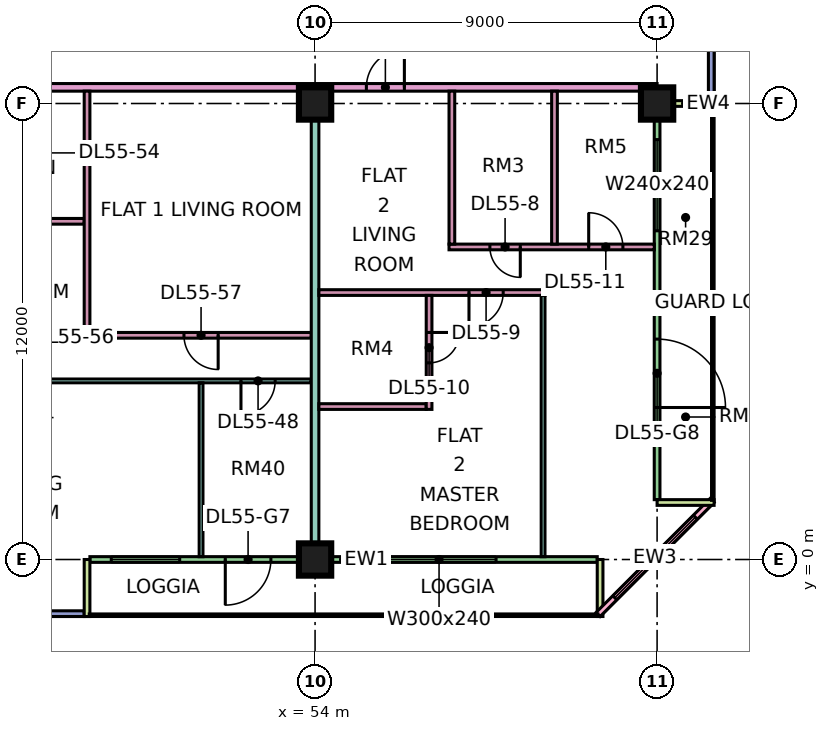
"""IFC4 building model, lengths in metres.
Left out: names, types, materials, properties, quantities, classifications, styles, units other than length and angle.
Written with IfcOpenShell. Run it as: python <this file> out.ifc"""

import sys

from ifc_helpers import new_model, si_unit, direction, frame, frame_2d, origin, origin_2d, place, context, subcontext, project, spatial, rectangle, extrude, element, fill, save


model = new_model("IFC4")
c1 = context("Model", 3, precision=1e-05, world=origin(), true_north=direction((0.0, 1.0)))
c2 = subcontext(c1, "Body", "Model", "MODEL_VIEW")
j1 = project(units=[si_unit("LENGTHUNIT", "METRE"), si_unit("PLANEANGLEUNIT", "RADIAN")], contexts=[c1])
p1 = place(None, origin())
s1 = spatial("IfcSite", under=j1, at=p1, CompositionType="ELEMENT")
p2 = place(p1, origin())
s2 = spatial("IfcBuilding", under=s1, at=p2, CompositionType="ELEMENT")
p3 = place(p2, frame((0.0, 0.0, 234.15)))
s3 = spatial("IfcBuildingStorey", under=s2, at=p3, CompositionType="ELEMENT", Elevation=234.15)
for number, where, z_axis, x_axis in (
    (1, (54.0, 0.0, 0.0), (0.0, 0.0, 1.0), (1.0, 0.0, 0.0)),
    (2, (54.0, 12.0, 0.0), (0.0, 0.0, 1.0), (1.0, 0.0, 0.0)),
    (3, (63.0, 12.0, 0.0), (0.0, 0.0, 1.0), (1.0, 0.0, 0.0)),
):
    element("IfcColumn", number, at=place(p3, frame(where, z_axis=z_axis, x_axis=x_axis)), inside=s3, PredefinedType="COLUMN", context=c2, shape_type="SweptSolid", body=[
        extrude(rectangle(XDim=0.85, YDim=0.85, at=origin_2d()), origin(), (0.0, 0.0, 1.0), 3.75),
    ])
p4 = place(p3, frame((36.075, -1.425, 0.0), z_axis=(0.0, 0.0, 1.0), x_axis=(1.0, 0.0, 0.0)))
e4 = element("IfcWall", 4, at=p4, inside=s3, PredefinedType="SOLIDWALL", context=c2, shape_type="SweptSolid", body=[
    extrude(rectangle(XDim=11.85, YDim=0.15, at=frame_2d((5.925, 0.0))), origin(), (0.0, 0.0, 1.0), 3.35),
])
p5 = place(p4, frame((0.562, 0.0, 0.45)))
e5 = element("IfcOpeningElement", 5, at=p5, cuts=e4, PredefinedType="OPENING", context=c2, shape_type="SweptSolid", body=[
    extrude(rectangle(XDim=1.8, YDim=2.4, at=frame_2d((0.9, 1.2))), frame((0.0, 0.085, 0.0), z_axis=(0.0, -1.0, 0.0), x_axis=(1.0, 0.0, 0.0)), (0.0, 0.0, 1.0), 0.17),
])
p6 = place(p4, frame((3.525, 0.0, 0.45)))
e6 = element("IfcOpeningElement", 6, at=p6, cuts=e4, PredefinedType="OPENING", context=c2, shape_type="SweptSolid", body=[
    extrude(rectangle(XDim=1.8, YDim=2.4, at=frame_2d((0.9, 1.2))), frame((0.0, 0.085, 0.0), z_axis=(0.0, -1.0, 0.0), x_axis=(1.0, 0.0, 0.0)), (0.0, 0.0, 1.0), 0.17),
])
p7 = place(p4, frame((7.387, 0.0, 0.45)))
e7 = element("IfcOpeningElement", 7, at=p7, cuts=e4, PredefinedType="OPENING", context=c2, shape_type="SweptSolid", body=[
    extrude(rectangle(XDim=3.0, YDim=2.4, at=frame_2d((1.5, 1.2))), frame((0.0, 0.085, 0.0), z_axis=(0.0, -1.0, 0.0), x_axis=(1.0, 0.0, 0.0)), (0.0, 0.0, 1.0), 0.17),
])
p8 = place(p3, frame((48.075, 0.0, 0.0), z_axis=(0.0, 0.0, 1.0), x_axis=(1.0, 0.0, 0.0)))
e8 = element("IfcWall", 8, at=p8, inside=s3, PredefinedType="SOLIDWALL", context=c2, shape_type="SweptSolid", body=[
    extrude(rectangle(XDim=13.35, YDim=0.15, at=frame_2d((6.675, 0.0))), origin(), (0.0, 0.0, 1.0), 3.35),
])
p9 = place(p8, frame((0.562, 0.0, 0.45)))
e9 = element("IfcOpeningElement", 9, at=p9, cuts=e8, PredefinedType="OPENING", context=c2, shape_type="SweptSolid", body=[
    extrude(rectangle(XDim=1.8, YDim=2.4, at=frame_2d((0.9, 1.2))), frame((0.0, 0.085, 0.0), z_axis=(0.0, -1.0, 0.0), x_axis=(1.0, 0.0, 0.0)), (0.0, 0.0, 1.0), 0.17),
])
p10 = place(p8, frame((3.562, 0.0, 0.0)))
e10 = element("IfcOpeningElement", 10, at=p10, cuts=e8, PredefinedType="OPENING", context=c2, shape_type="SweptSolid", body=[
    extrude(rectangle(XDim=1.2, YDim=2.4, at=frame_2d((0.6, 1.2))), frame((0.0, 0.085, 0.0), z_axis=(0.0, -1.0, 0.0), x_axis=(1.0, 0.0, 0.0)), (0.0, 0.0, 1.0), 0.17),
])
p11 = place(p8, frame((7.688, 0.0, 0.45)))
e11 = element("IfcOpeningElement", 11, at=p11, cuts=e8, PredefinedType="OPENING", context=c2, shape_type="SweptSolid", body=[
    extrude(rectangle(XDim=3.0, YDim=2.4, at=frame_2d((1.5, 1.2))), frame((0.0, 0.085, 0.0), z_axis=(0.0, -1.0, 0.0), x_axis=(1.0, 0.0, 0.0)), (0.0, 0.0, 1.0), 0.17),
])
for number, where, z_axis, x_axis in (
    (12, (48.0, -1.5, 0.0), (0.0, 0.0, 1.0), (0.0, 1.0, 0.0)),
    (13, (61.5, -1.5, 0.0), (0.0, 0.0, 1.0), (0.0, 1.0, 0.0)),
):
    element("IfcWall", number, at=place(p3, frame(where, z_axis=z_axis, x_axis=x_axis)), inside=s3, PredefinedType="SOLIDWALL", context=c2, shape_type="SweptSolid", body=[
        extrude(rectangle(XDim=1.5, YDim=0.15, at=frame_2d((0.75, 0.0))), origin(), (0.0, 0.0, 1.0), 3.35),
    ])
p12 = place(p3, frame((61.447, -1.447, 0.0), z_axis=(0.0, 0.0, 1.0), x_axis=(0.707106781187, 0.707106781187, 0.0)))
e14 = element("IfcWall", 14, at=p12, inside=s3, PredefinedType="SOLIDWALL", context=c2, shape_type="SweptSolid", body=[
    extrude(rectangle(XDim=4.243, YDim=0.15, at=frame_2d((2.121, 0.0))), origin(), (0.0, 0.0, 1.0), 3.35),
])
p13 = place(p12, frame((0.621, 0.0, 0.45)))
e15 = element("IfcOpeningElement", 15, at=p13, cuts=e14, PredefinedType="OPENING", context=c2, shape_type="SweptSolid", body=[
    extrude(rectangle(XDim=3.0, YDim=2.4, at=frame_2d((1.5, 1.2))), frame((0.0, 0.085, 0.0), z_axis=(0.0, -1.0, 0.0), x_axis=(1.0, 0.0, 0.0)), (0.0, 0.0, 1.0), 0.17),
])
p14 = place(p3, frame((63.0, 1.575, 0.0), z_axis=(0.0, 0.0, 1.0), x_axis=(0.0, 1.0, 0.0)))
e16 = element("IfcWall", 16, at=p14, inside=s3, PredefinedType="SOLIDWALL", context=c2, shape_type="SweptSolid", body=[
    extrude(rectangle(XDim=10.35, YDim=0.15, at=frame_2d((5.175, 0.0))), origin(), (0.0, 0.0, 1.0), 3.35),
])
p15 = place(p14, frame((2.425, 0.0, 0.0)))
e17 = element("IfcOpeningElement", 17, at=p15, cuts=e16, PredefinedType="OPENING", context=c2, shape_type="SweptSolid", body=[
    extrude(rectangle(XDim=1.8, YDim=2.4, at=frame_2d((0.9, 1.2))), frame((0.0, 0.085, 0.0), z_axis=(0.0, -1.0, 0.0), x_axis=(1.0, 0.0, 0.0)), (0.0, 0.0, 1.0), 0.17),
])
p16 = place(p14, frame((7.075, 0.0, 0.45)))
e18 = element("IfcOpeningElement", 18, at=p16, cuts=e16, PredefinedType="OPENING", context=c2, shape_type="SweptSolid", body=[
    extrude(rectangle(XDim=2.4, YDim=2.4, at=frame_2d((1.2, 1.2))), frame((0.0, 0.085, 0.0), z_axis=(0.0, -1.0, 0.0), x_axis=(1.0, 0.0, 0.0)), (0.0, 0.0, 1.0), 0.17),
])
for number, where, z_axis, x_axis in (
    (19, (64.5, 1.5, 0.0), (0.0, 0.0, 1.0), (-1.0, 0.0, 0.0)),
    (20, (64.5, 12.0, 0.0), (0.0, 0.0, 1.0), (-1.0, 0.0, 0.0)),
):
    element("IfcWall", number, at=place(p3, frame(where, z_axis=z_axis, x_axis=x_axis)), inside=s3, PredefinedType="SOLIDWALL", context=c2, shape_type="SweptSolid", body=[
        extrude(rectangle(XDim=1.5, YDim=0.15, at=frame_2d((0.75, 0.0))), origin(), (0.0, 0.0, 1.0), 3.35),
    ])
p17 = place(p3, frame((64.425, 12.075, 0.0), z_axis=(0.0, 0.0, 1.0), x_axis=(0.0, 1.0, 0.0)))
e21 = element("IfcWall", 21, at=p17, inside=s3, PredefinedType="SOLIDWALL", context=c2, shape_type="SweptSolid", body=[
    extrude(rectangle(XDim=10.425, YDim=0.15, at=frame_2d((5.212, 0.0))), origin(), (0.0, 0.0, 1.0), 3.35),
])
p18 = place(p17, frame((5.475, 0.0, 0.45)))
e22 = element("IfcOpeningElement", 22, at=p18, cuts=e21, PredefinedType="OPENING", context=c2, shape_type="SweptSolid", body=[
    extrude(rectangle(XDim=3.0, YDim=2.4, at=frame_2d((1.5, 1.2))), frame((0.0, 0.085, 0.0), z_axis=(0.0, -1.0, 0.0), x_axis=(1.0, 0.0, 0.0)), (0.0, 0.0, 1.0), 0.17),
])
p19 = place(p3, frame((33.05, 4.7, 0.0), z_axis=(0.0, 0.0, 1.0), x_axis=(1.0, 0.0, 0.0)))
e23 = element("IfcWall", 23, at=p19, inside=s3, PredefinedType="PARTITIONING", context=c2, shape_type="SweptSolid", body=[
    extrude(rectangle(XDim=20.85, YDim=0.1, at=frame_2d((10.425, 0.0))), origin(), (0.0, 0.0, 1.0), 3.35),
])
p20 = place(p19, frame((1.0, 0.0, 0.0)))
e24 = element("IfcOpeningElement", 24, at=p20, cuts=e23, PredefinedType="OPENING", context=c2, shape_type="SweptSolid", body=[
    extrude(rectangle(XDim=0.9, YDim=2.1, at=frame_2d((0.45, 1.05))), frame((0.0, 0.06, 0.0), z_axis=(0.0, -1.0, 0.0), x_axis=(1.0, 0.0, 0.0)), (0.0, 0.0, 1.0), 0.12),
])
p21 = place(p19, frame((4.0, 0.0, 0.0)))
e25 = element("IfcOpeningElement", 25, at=p21, cuts=e23, PredefinedType="OPENING", context=c2, shape_type="SweptSolid", body=[
    extrude(rectangle(XDim=0.9, YDim=2.1, at=frame_2d((0.45, 1.05))), frame((0.0, 0.06, 0.0), z_axis=(0.0, -1.0, 0.0), x_axis=(1.0, 0.0, 0.0)), (0.0, 0.0, 1.0), 0.12),
])
p22 = place(p19, frame((7.0, 0.0, 0.0)))
e26 = element("IfcOpeningElement", 26, at=p22, cuts=e23, PredefinedType="OPENING", context=c2, shape_type="SweptSolid", body=[
    extrude(rectangle(XDim=0.9, YDim=2.1, at=frame_2d((0.45, 1.05))), frame((0.0, 0.06, 0.0), z_axis=(0.0, -1.0, 0.0), x_axis=(1.0, 0.0, 0.0)), (0.0, 0.0, 1.0), 0.12),
])
p23 = place(p19, frame((19.0, 0.0, 0.0)))
e27 = element("IfcOpeningElement", 27, at=p23, cuts=e23, PredefinedType="OPENING", context=c2, shape_type="SweptSolid", body=[
    extrude(rectangle(XDim=0.9, YDim=2.1, at=frame_2d((0.45, 1.05))), frame((0.0, 0.06, 0.0), z_axis=(0.0, -1.0, 0.0), x_axis=(1.0, 0.0, 0.0)), (0.0, 0.0, 1.0), 0.12),
])
p24 = place(p19, frame((13.0, 0.0, 0.0)))
e28 = element("IfcOpeningElement", 28, at=p24, cuts=e23, PredefinedType="OPENING", context=c2, shape_type="SweptSolid", body=[
    extrude(rectangle(XDim=0.9, YDim=2.1, at=frame_2d((0.45, 1.05))), frame((0.0, 0.06, 0.0), z_axis=(0.0, -1.0, 0.0), x_axis=(1.0, 0.0, 0.0)), (0.0, 0.0, 1.0), 0.12),
])
p25 = place(p3, frame((40.65, 12.425, 0.0), z_axis=(0.0, 0.0, 1.0), x_axis=(1.0, 0.0, 0.0)))
e29 = element("IfcWall", 29, at=p25, inside=s3, PredefinedType="PARTITIONING", context=c2, shape_type="SweptSolid", body=[
    extrude(rectangle(XDim=22.35, YDim=0.2, at=frame_2d((11.175, 0.0))), origin(), (0.0, 0.0, 1.0), 3.35),
])
p26 = place(p25, frame((14.7, 0.0, 0.0)))
e30 = element("IfcOpeningElement", 30, at=p26, cuts=e29, PredefinedType="OPENING", context=c2, shape_type="SweptSolid", body=[
    extrude(rectangle(XDim=1.0, YDim=2.1, at=frame_2d((0.5, 1.05))), frame((0.0, 0.11, 0.0), z_axis=(0.0, -1.0, 0.0), x_axis=(1.0, 0.0, 0.0)), (0.0, 0.0, 1.0), 0.22),
])
p27 = place(p25, frame((1.05, 0.0, 0.0)))
e31 = element("IfcOpeningElement", 31, at=p27, cuts=e29, PredefinedType="OPENING", context=c2, shape_type="SweptSolid", body=[
    extrude(rectangle(XDim=1.0, YDim=2.1, at=frame_2d((0.5, 1.05))), frame((0.0, 0.11, 0.0), z_axis=(0.0, -1.0, 0.0), x_axis=(1.0, 0.0, 0.0)), (0.0, 0.0, 1.0), 0.22),
])
p28 = place(p3, frame((43.575, 5.9, 0.0), z_axis=(0.0, 0.0, 1.0), x_axis=(1.0, 0.0, 0.0)))
e32 = element("IfcWall", 32, at=p28, inside=s3, PredefinedType="PARTITIONING", context=c2, shape_type="SweptSolid", body=[
    extrude(rectangle(XDim=10.325, YDim=0.15, at=frame_2d((5.163, 0.0))), origin(), (0.0, 0.0, 1.0), 3.35),
])
p29 = place(p28, frame((1.825, 0.0, 0.0)))
e33 = element("IfcOpeningElement", 33, at=p29, cuts=e32, PredefinedType="OPENING", context=c2, shape_type="SweptSolid", body=[
    extrude(rectangle(XDim=0.8, YDim=2.1, at=frame_2d((0.4, 1.05))), frame((0.0, 0.085, 0.0), z_axis=(0.0, -1.0, 0.0), x_axis=(1.0, 0.0, 0.0)), (0.0, 0.0, 1.0), 0.17),
])
p30 = place(p28, frame((6.975, 0.0, 0.0)))
e34 = element("IfcOpeningElement", 34, at=p30, cuts=e32, PredefinedType="OPENING", context=c2, shape_type="SweptSolid", body=[
    extrude(rectangle(XDim=0.9, YDim=2.1, at=frame_2d((0.45, 1.05))), frame((0.0, 0.085, 0.0), z_axis=(0.0, -1.0, 0.0), x_axis=(1.0, 0.0, 0.0)), (0.0, 0.0, 1.0), 0.17),
])
p31 = place(p3, frame((43.725, 8.9, 0.0), z_axis=(0.0, 0.0, 1.0), x_axis=(1.0, 0.0, 0.0)))
e35 = element("IfcWall", 35, at=p31, inside=s3, PredefinedType="PARTITIONING", context=c2, shape_type="SweptSolid", body=[
    extrude(rectangle(XDim=4.2, YDim=0.15, at=frame_2d((2.1, 0.0))), origin(), (0.0, 0.0, 1.0), 3.35),
])
p32 = place(p3, frame((48.0, 5.975, 0.0), z_axis=(0.0, 0.0, 1.0), x_axis=(0.0, 1.0, 0.0)))
e36 = element("IfcWall", 36, at=p32, inside=s3, PredefinedType="PARTITIONING", context=c2, shape_type="SweptSolid", body=[
    extrude(rectangle(XDim=6.35, YDim=0.15, at=frame_2d((3.175, 0.0))), origin(), (0.0, 0.0, 1.0), 3.35),
])
p33 = place(p3, frame((51.0, 0.074, 0.0), z_axis=(0.0, 0.0, 1.0), x_axis=(0.0, 1.0, 0.0)))
e37 = element("IfcWall", 37, at=p33, inside=s3, PredefinedType="PARTITIONING", context=c2, shape_type="SweptSolid", body=[
    extrude(rectangle(XDim=4.576, YDim=0.1, at=frame_2d((2.288, 0.0))), origin(), (0.0, 0.0, 1.0), 3.35),
])
p34 = place(p3, frame((54.0, 0.074, 0.0), z_axis=(0.0, 0.0, 1.0), x_axis=(0.0, 1.0, 0.0)))
e38 = element("IfcWall", 38, at=p34, inside=s3, PredefinedType="PARTITIONING", context=c2, shape_type="SweptSolid", body=[
    extrude(rectangle(XDim=12.251, YDim=0.2, at=frame_2d((6.125, 0.0))), origin(), (0.0, 0.0, 1.0), 3.35),
])
p35 = place(p3, frame((54.1, 4.025, 0.0), z_axis=(0.0, 0.0, 1.0), x_axis=(1.0, 0.0, 0.0)))
e39 = element("IfcWall", 39, at=p35, inside=s3, PredefinedType="PARTITIONING", context=c2, shape_type="SweptSolid", body=[
    extrude(rectangle(XDim=2.825, YDim=0.15, at=frame_2d((1.413, 0.0))), origin(), (0.0, 0.0, 1.0), 3.35),
])
p36 = place(p3, frame((54.1, 7.025, 0.0), z_axis=(0.0, 0.0, 1.0), x_axis=(1.0, 0.0, 0.0)))
e40 = element("IfcWall", 40, at=p36, inside=s3, PredefinedType="PARTITIONING", context=c2, shape_type="SweptSolid", body=[
    extrude(rectangle(XDim=5.95, YDim=0.15, at=frame_2d((2.975, 0.0))), origin(), (0.0, 0.0, 1.0), 3.35),
])
p37 = place(p36, frame((3.95, 0.0, 0.0)))
e41 = element("IfcOpeningElement", 41, at=p37, cuts=e40, PredefinedType="OPENING", context=c2, shape_type="SweptSolid", body=[
    extrude(rectangle(XDim=0.9, YDim=2.1, at=frame_2d((0.45, 1.05))), frame((0.0, 0.085, 0.0), z_axis=(0.0, -1.0, 0.0), x_axis=(1.0, 0.0, 0.0)), (0.0, 0.0, 1.0), 0.17),
])
p38 = place(p3, frame((57.0, 3.95, 0.0), z_axis=(0.0, 0.0, 1.0), x_axis=(0.0, 1.0, 0.0)))
e42 = element("IfcWall", 42, at=p38, inside=s3, PredefinedType="PARTITIONING", context=c2, shape_type="SweptSolid", body=[
    extrude(rectangle(XDim=3.0, YDim=0.15, at=frame_2d((1.5, 0.0))), origin(), (0.0, 0.0, 1.0), 3.35),
])
p39 = place(p38, frame((1.225, 0.0, 0.0)))
e43 = element("IfcOpeningElement", 43, at=p39, cuts=e42, PredefinedType="OPENING", context=c2, shape_type="SweptSolid", body=[
    extrude(rectangle(XDim=0.8, YDim=2.1, at=frame_2d((0.4, 1.05))), frame((0.0, 0.085, 0.0), z_axis=(0.0, -1.0, 0.0), x_axis=(1.0, 0.0, 0.0)), (0.0, 0.0, 1.0), 0.17),
])
p40 = place(p3, frame((57.525, 8.225, 0.0), z_axis=(0.0, 0.0, 1.0), x_axis=(1.0, 0.0, 0.0)))
e44 = element("IfcWall", 44, at=p40, inside=s3, PredefinedType="PARTITIONING", context=c2, shape_type="SweptSolid", body=[
    extrude(rectangle(XDim=5.401, YDim=0.15, at=frame_2d((2.701, 0.0))), origin(), (0.0, 0.0, 1.0), 3.35),
])
p41 = place(p40, frame((1.075, 0.0, 0.0)))
e45 = element("IfcOpeningElement", 45, at=p41, cuts=e44, PredefinedType="OPENING", context=c2, shape_type="SweptSolid", body=[
    extrude(rectangle(XDim=0.8, YDim=2.1, at=frame_2d((0.4, 1.05))), frame((0.0, 0.085, 0.0), z_axis=(0.0, -1.0, 0.0), x_axis=(1.0, 0.0, 0.0)), (0.0, 0.0, 1.0), 0.17),
])
p42 = place(p40, frame((3.675, 0.0, 0.0)))
e46 = element("IfcOpeningElement", 46, at=p42, cuts=e44, PredefinedType="OPENING", context=c2, shape_type="SweptSolid", body=[
    extrude(rectangle(XDim=0.9, YDim=2.1, at=frame_2d((0.45, 1.05))), frame((0.0, 0.085, 0.0), z_axis=(0.0, -1.0, 0.0), x_axis=(1.0, 0.0, 0.0)), (0.0, 0.0, 1.0), 0.17),
])
p43 = place(p3, frame((57.6, 8.3, 0.0), z_axis=(0.0, 0.0, 1.0), x_axis=(0.0, 1.0, 0.0)))
e47 = element("IfcWall", 47, at=p43, inside=s3, PredefinedType="PARTITIONING", context=c2, shape_type="SweptSolid", body=[
    extrude(rectangle(XDim=4.025, YDim=0.15, at=frame_2d((2.012, 0.0))), origin(), (0.0, 0.0, 1.0), 3.35),
])
p44 = place(p3, frame((60.0, 0.074, 0.0), z_axis=(0.0, 0.0, 1.0), x_axis=(0.0, 1.0, 0.0)))
e48 = element("IfcWall", 48, at=p44, inside=s3, PredefinedType="PARTITIONING", context=c2, shape_type="SweptSolid", body=[
    extrude(rectangle(XDim=6.876, YDim=0.1, at=frame_2d((3.438, 0.0))), origin(), (0.0, 0.0, 1.0), 3.35),
])
p45 = place(p3, frame((60.3, 8.3, 0.0), z_axis=(0.0, 0.0, 1.0), x_axis=(0.0, 1.0, 0.0)))
e49 = element("IfcWall", 49, at=p45, inside=s3, PredefinedType="PARTITIONING", context=c2, shape_type="SweptSolid", body=[
    extrude(rectangle(XDim=4.025, YDim=0.15, at=frame_2d((2.012, 0.0))), origin(), (0.0, 0.0, 1.0), 3.35),
])
p46 = place(p9, origin())
e50 = element("IfcWindow", 50, at=p46, inside=s3, PartitioningType="SINGLE_PANEL", PredefinedType="WINDOW", context=c2, shape_type="SweptSolid", body=[
    extrude(rectangle(XDim=1.8, YDim=2.4, at=frame_2d((0.9, 1.2))), frame((0.0, 0.03, 0.0), z_axis=(0.0, -1.0, 0.0), x_axis=(1.0, 0.0, 0.0)), (0.0, 0.0, 1.0), 0.06),
])
fill(e9, e50)
p47 = place(p10, frame((1.2, 0.0, 0.0), z_axis=(0.0, 0.0, 1.0), x_axis=(-1.0, 0.0, 0.0)))
e51 = element("IfcDoor", 51, at=p47, inside=s3, OperationType="DOUBLE_DOOR_SINGLE_SWING", PredefinedType="DOOR", context=c2, shape_type="SweptSolid", body=[
    extrude(rectangle(XDim=1.2, YDim=2.4, at=frame_2d((0.6, 1.2))), frame((0.0, 0.025, 0.0), z_axis=(0.0, -1.0, 0.0), x_axis=(1.0, 0.0, 0.0)), (0.0, 0.0, 1.0), 0.05),
])
fill(e10, e51)
p48 = place(p11, origin())
e52 = element("IfcWindow", 52, at=p48, inside=s3, PartitioningType="SINGLE_PANEL", PredefinedType="WINDOW", context=c2, shape_type="SweptSolid", body=[
    extrude(rectangle(XDim=3.0, YDim=2.4, at=frame_2d((1.5, 1.2))), frame((0.0, 0.03, 0.0), z_axis=(0.0, -1.0, 0.0), x_axis=(1.0, 0.0, 0.0)), (0.0, 0.0, 1.0), 0.06),
])
fill(e11, e52)
p49 = place(p13, origin())
e53 = element("IfcWindow", 53, at=p49, inside=s3, PartitioningType="SINGLE_PANEL", PredefinedType="WINDOW", context=c2, shape_type="SweptSolid", body=[
    extrude(rectangle(XDim=3.0, YDim=2.4, at=frame_2d((1.5, 1.2))), frame((0.0, 0.03, 0.0), z_axis=(0.0, -1.0, 0.0), x_axis=(1.0, 0.0, 0.0)), (0.0, 0.0, 1.0), 0.06),
])
fill(e15, e53)
p50 = place(p15, frame((1.8, 0.0, 0.0), z_axis=(0.0, 0.0, 1.0), x_axis=(-1.0, 0.0, 0.0)))
e54 = element("IfcDoor", 54, at=p50, inside=s3, OperationType="DOUBLE_DOOR_SINGLE_SWING", PredefinedType="DOOR", context=c2, shape_type="SweptSolid", body=[
    extrude(rectangle(XDim=1.8, YDim=2.4, at=frame_2d((0.9, 1.2))), frame((0.0, 0.025, 0.0), z_axis=(0.0, -1.0, 0.0), x_axis=(1.0, 0.0, 0.0)), (0.0, 0.0, 1.0), 0.05),
])
fill(e17, e54)
p51 = place(p16, origin())
e55 = element("IfcWindow", 55, at=p51, inside=s3, PartitioningType="SINGLE_PANEL", PredefinedType="WINDOW", context=c2, shape_type="SweptSolid", body=[
    extrude(rectangle(XDim=2.4, YDim=2.4, at=frame_2d((1.2, 1.2))), frame((0.0, 0.03, 0.0), z_axis=(0.0, -1.0, 0.0), x_axis=(1.0, 0.0, 0.0)), (0.0, 0.0, 1.0), 0.06),
])
fill(e18, e55)
p52 = place(p41, origin())
e56 = element("IfcDoor", 56, at=p52, inside=s3, OperationType="SINGLE_SWING_RIGHT", PredefinedType="DOOR", context=c2, shape_type="SweptSolid", body=[
    extrude(rectangle(XDim=0.8, YDim=2.1, at=frame_2d((0.4, 1.05))), frame((0.0, 0.025, 0.0), z_axis=(0.0, -1.0, 0.0), x_axis=(1.0, 0.0, 0.0)), (0.0, 0.0, 1.0), 0.05),
])
fill(e45, e56)
p53 = place(p37, frame((0.9, 0.0, 0.0), z_axis=(0.0, 0.0, 1.0), x_axis=(-1.0, 0.0, 0.0)))
e57 = element("IfcDoor", 57, at=p53, inside=s3, OperationType="SINGLE_SWING_LEFT", PredefinedType="DOOR", context=c2, shape_type="SweptSolid", body=[
    extrude(rectangle(XDim=0.9, YDim=2.1, at=frame_2d((0.45, 1.05))), frame((0.0, 0.025, 0.0), z_axis=(0.0, -1.0, 0.0), x_axis=(1.0, 0.0, 0.0)), (0.0, 0.0, 1.0), 0.05),
])
fill(e41, e57)
p54 = place(p39, origin())
e58 = element("IfcDoor", 58, at=p54, inside=s3, OperationType="SINGLE_SWING_RIGHT", PredefinedType="DOOR", context=c2, shape_type="SweptSolid", body=[
    extrude(rectangle(XDim=0.8, YDim=2.1, at=frame_2d((0.4, 1.05))), frame((0.0, 0.025, 0.0), z_axis=(0.0, -1.0, 0.0), x_axis=(1.0, 0.0, 0.0)), (0.0, 0.0, 1.0), 0.05),
])
fill(e43, e58)
p55 = place(p42, origin())
e59 = element("IfcDoor", 59, at=p55, inside=s3, OperationType="SINGLE_SWING_LEFT", PredefinedType="DOOR", context=c2, shape_type="SweptSolid", body=[
    extrude(rectangle(XDim=0.9, YDim=2.1, at=frame_2d((0.45, 1.05))), frame((0.0, 0.025, 0.0), z_axis=(0.0, -1.0, 0.0), x_axis=(1.0, 0.0, 0.0)), (0.0, 0.0, 1.0), 0.05),
])
fill(e46, e59)
p56 = place(p26, frame((1.0, 0.0, 0.0), z_axis=(0.0, 0.0, 1.0), x_axis=(-1.0, 0.0, 0.0)))
e60 = element("IfcDoor", 60, at=p56, inside=s3, OperationType="SINGLE_SWING_RIGHT", PredefinedType="DOOR", context=c2, shape_type="SweptSolid", body=[
    extrude(rectangle(XDim=1.0, YDim=2.1, at=frame_2d((0.5, 1.05))), frame((0.0, 0.025, 0.0), z_axis=(0.0, -1.0, 0.0), x_axis=(1.0, 0.0, 0.0)), (0.0, 0.0, 1.0), 0.05),
])
fill(e30, e60)
p57 = place(p23, frame((0.9, 0.0, 0.0), z_axis=(0.0, 0.0, 1.0), x_axis=(-1.0, 0.0, 0.0)))
e61 = element("IfcDoor", 61, at=p57, inside=s3, OperationType="SINGLE_SWING_LEFT", PredefinedType="DOOR", context=c2, shape_type="SweptSolid", body=[
    extrude(rectangle(XDim=0.9, YDim=2.1, at=frame_2d((0.45, 1.05))), frame((0.0, 0.025, 0.0), z_axis=(0.0, -1.0, 0.0), x_axis=(1.0, 0.0, 0.0)), (0.0, 0.0, 1.0), 0.05),
])
fill(e27, e61)
p58 = place(p30, origin())
e62 = element("IfcDoor", 62, at=p58, inside=s3, OperationType="SINGLE_SWING_RIGHT", PredefinedType="DOOR", context=c2, shape_type="SweptSolid", body=[
    extrude(rectangle(XDim=0.9, YDim=2.1, at=frame_2d((0.45, 1.05))), frame((0.0, 0.025, 0.0), z_axis=(0.0, -1.0, 0.0), x_axis=(1.0, 0.0, 0.0)), (0.0, 0.0, 1.0), 0.05),
])
fill(e34, e62)
save(model, sys.argv[1])
